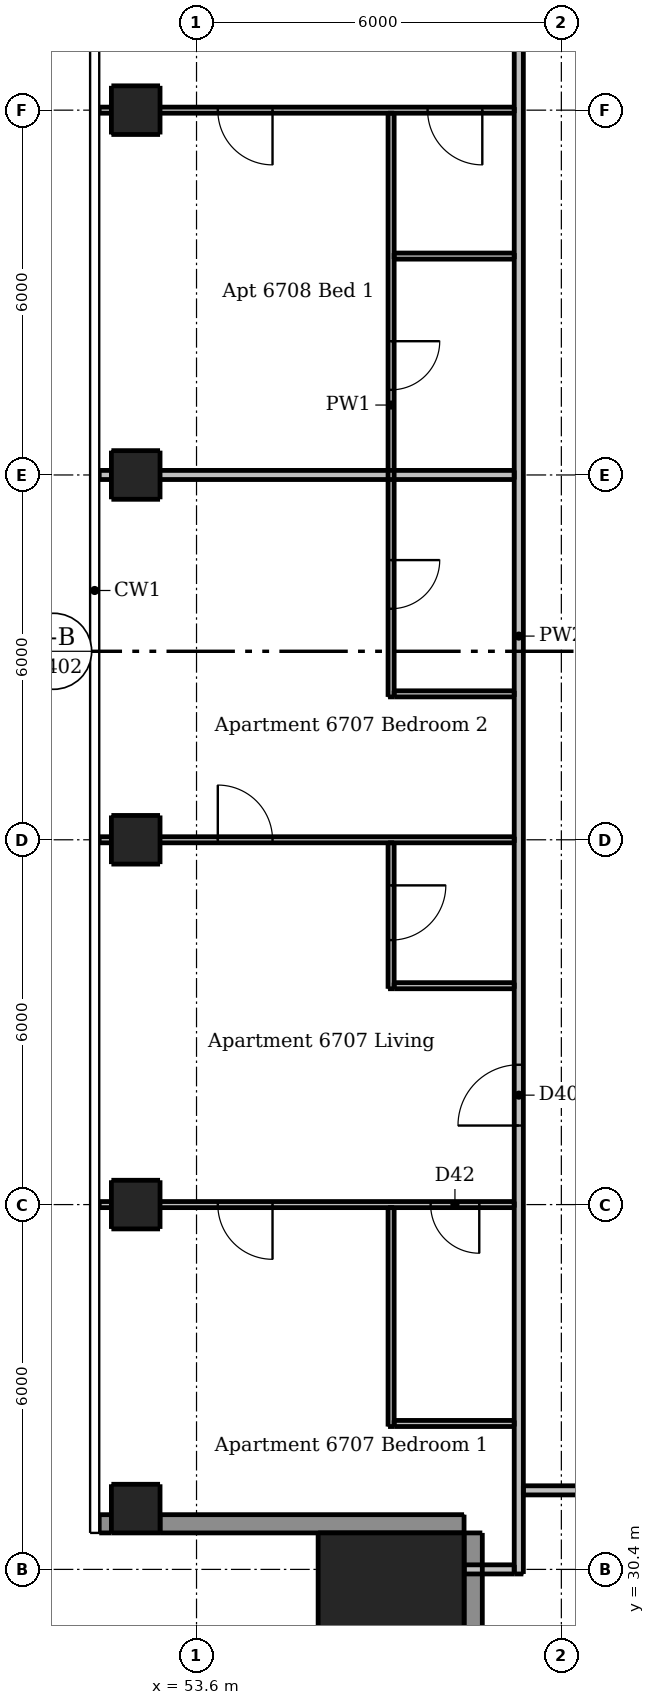
"""IFC4 building model, lengths in metres.
Left out: names, types, materials, properties, quantities, classifications, styles, units other than length and angle.
Written with IfcOpenShell. Run it as: python <this file> out.ifc"""

import sys

from ifc_helpers import new_model, si_unit, direction, frame, frame_2d, origin, origin_2d, place, context, subcontext, project, spatial, rectangle, extrude, element, fill, save


model = new_model("IFC4")
c1 = context("Model", 3, precision=1e-05, world=origin(), true_north=direction((0.0, 1.0)))
c2 = subcontext(c1, "Body", "Model", "MODEL_VIEW")
j1 = project(units=[si_unit("LENGTHUNIT", "METRE"), si_unit("PLANEANGLEUNIT", "RADIAN")], contexts=[c1])
p1 = place(None, origin())
s1 = spatial("IfcSite", under=j1, at=p1, CompositionType="ELEMENT")
p2 = place(p1, origin())
s2 = spatial("IfcBuilding", under=s1, at=p2, CompositionType="ELEMENT")
p3 = place(p2, frame((0.0, 0.0, 252.1)))
s3 = spatial("IfcBuildingStorey", under=s2, at=p3, CompositionType="ELEMENT", Elevation=252.1)
for number, where, z_axis, x_axis in (
    (1, (52.6, 31.4, 0.0), (0.0, 0.0, 1.0), (1.0, 0.0, 0.0)),
    (2, (52.6, 36.4, 0.0), (0.0, 0.0, 1.0), (1.0, 0.0, 0.0)),
    (3, (52.6, 42.4, 0.0), (0.0, 0.0, 1.0), (1.0, 0.0, 0.0)),
    (4, (52.6, 48.4, 0.0), (0.0, 0.0, 1.0), (1.0, 0.0, 0.0)),
    (5, (52.6, 54.4, 0.0), (0.0, 0.0, 1.0), (1.0, 0.0, 0.0)),
):
    element("IfcColumn", number, at=place(p3, frame(where, z_axis=z_axis, x_axis=x_axis)), inside=s3, PredefinedType="COLUMN", context=c2, shape_type="SweptSolid", body=[
        extrude(rectangle(XDim=0.8, YDim=0.8, at=origin_2d()), origin(), (0.0, 0.0, 1.0), 3.05),
    ])
p4 = place(p3, frame((56.8, 29.8, 0.0), z_axis=(0.0, 0.0, 1.0), x_axis=(1.0, 0.0, 0.0)))
e6 = element("IfcColumn", 6, at=p4, inside=s3, PredefinedType="COLUMN", context=c2, shape_type="SweptSolid", body=[
    extrude(rectangle(XDim=2.4, YDim=2.4, at=origin_2d()), origin(), (0.0, 0.0, 1.0), 3.3),
])
p5 = place(p3, frame((52.0, 31.15, 0.0), z_axis=(0.0, 0.0, 1.0), x_axis=(1.0, 0.0, 0.0)))
e7 = element("IfcWall", 7, at=p5, inside=s3, PredefinedType="SOLIDWALL", context=c2, shape_type="SweptSolid", body=[
    extrude(rectangle(XDim=0.2, YDim=0.3, at=frame_2d((0.1, 0.0))), origin(), (0.0, 0.0, 1.0), 3.05),
])
p6 = place(p3, frame((53.0, 31.15, 0.0), z_axis=(0.0, 0.0, 1.0), x_axis=(1.0, 0.0, 0.0)))
e8 = element("IfcWall", 8, at=p6, inside=s3, PredefinedType="SOLIDWALL", context=c2, shape_type="SweptSolid", body=[
    extrude(rectangle(XDim=5.0, YDim=0.3, at=frame_2d((2.5, 0.0))), origin(), (0.0, 0.0, 1.0), 3.05),
])
p7 = place(p3, frame((58.15, 31.0, 0.0), z_axis=(0.0, 0.0, 1.0), x_axis=(0.0, -1.0, 0.0)))
e9 = element("IfcWall", 9, at=p7, inside=s3, PredefinedType="SOLIDWALL", context=c2, shape_type="SweptSolid", body=[
    extrude(rectangle(XDim=6.0, YDim=0.3, at=frame_2d((3.0, 0.0))), origin(), (0.0, 0.0, 1.0), 3.05),
])
p8 = place(p7, frame((1.8, 0.0, 0.15)))
e10 = element("IfcOpeningElement", 10, at=p8, cuts=e9, PredefinedType="OPENING", context=c2, shape_type="SweptSolid", body=[
    extrude(rectangle(XDim=2.4, YDim=2.1, at=frame_2d((1.2, 1.05))), frame((0.0, 0.16, 0.0), z_axis=(0.0, -1.0, 0.0), x_axis=(1.0, 0.0, 0.0)), (0.0, 0.0, 1.0), 0.32),
])
p9 = place(p3, frame((56.8, 32.75, 0.0), z_axis=(0.0, 0.0, 1.0), x_axis=(0.0, 1.0, 0.0)))
e11 = element("IfcWall", 11, at=p9, inside=s3, PredefinedType="PARTITIONING", context=c2, shape_type="SweptSolid", body=[
    extrude(rectangle(XDim=3.6, YDim=0.1, at=frame_2d((1.8, 0.0))), origin(), (0.0, 0.0, 1.0), 3.05),
])
p10 = place(p3, frame((56.8, 42.35, 0.0), z_axis=(0.0, 0.0, 1.0), x_axis=(0.0, -1.0, 0.0)))
e12 = element("IfcWall", 12, at=p10, inside=s3, PredefinedType="PARTITIONING", context=c2, shape_type="SweptSolid", body=[
    extrude(rectangle(XDim=2.4, YDim=0.1, at=frame_2d((1.2, 0.0))), origin(), (0.0, 0.0, 1.0), 3.05),
])
p11 = place(p10, frame((0.7, 0.0, 0.0)))
e13 = element("IfcOpeningElement", 13, at=p11, cuts=e12, PredefinedType="OPENING", context=c2, shape_type="SweptSolid", body=[
    extrude(rectangle(XDim=0.9, YDim=2.1, at=frame_2d((0.45, 1.05))), frame((0.0, 0.06, 0.0), z_axis=(0.0, -1.0, 0.0), x_axis=(1.0, 0.0, 0.0)), (0.0, 0.0, 1.0), 0.12),
])
p12 = place(p3, frame((56.8, 54.35, 0.0), z_axis=(0.0, 0.0, 1.0), x_axis=(0.0, -1.0, 0.0)))
e14 = element("IfcWall", 14, at=p12, inside=s3, PredefinedType="PARTITIONING", context=c2, shape_type="SweptSolid", body=[
    extrude(rectangle(XDim=9.6, YDim=0.1, at=frame_2d((4.8, 0.0))), origin(), (0.0, 0.0, 1.0), 3.05),
])
p13 = place(p12, frame((7.35, 0.0, 0.0)))
e15 = element("IfcOpeningElement", 15, at=p13, cuts=e14, PredefinedType="OPENING", context=c2, shape_type="SweptSolid", body=[
    extrude(rectangle(XDim=0.8, YDim=2.1, at=frame_2d((0.4, 1.05))), frame((0.0, 0.06, 0.0), z_axis=(0.0, -1.0, 0.0), x_axis=(1.0, 0.0, 0.0)), (0.0, 0.0, 1.0), 0.12),
])
p14 = place(p12, frame((3.75, 0.0, 0.0)))
e16 = element("IfcOpeningElement", 16, at=p14, cuts=e14, PredefinedType="OPENING", context=c2, shape_type="SweptSolid", body=[
    extrude(rectangle(XDim=0.8, YDim=2.1, at=frame_2d((0.4, 1.05))), frame((0.0, 0.06, 0.0), z_axis=(0.0, -1.0, 0.0), x_axis=(1.0, 0.0, 0.0)), (0.0, 0.0, 1.0), 0.12),
])
p15 = place(p3, frame((58.825, 54.4, 0.0), z_axis=(0.0, 0.0, 1.0), x_axis=(-1.0, 0.0, 0.0)))
e17 = element("IfcWall", 17, at=p15, inside=s3, PredefinedType="PARTITIONING", context=c2, shape_type="SweptSolid", body=[
    extrude(rectangle(XDim=6.825, YDim=0.1, at=frame_2d((3.413, 0.0))), origin(), (0.0, 0.0, 1.0), 2.516),
])
p16 = place(p15, frame((0.525, 0.0, 0.0)))
e18 = element("IfcOpeningElement", 18, at=p16, cuts=e17, PredefinedType="OPENING", context=c2, shape_type="SweptSolid", body=[
    extrude(rectangle(XDim=0.9, YDim=2.1, at=frame_2d((0.45, 1.05))), frame((0.0, 0.06, 0.0), z_axis=(0.0, -1.0, 0.0), x_axis=(1.0, 0.0, 0.0)), (0.0, 0.0, 1.0), 0.12),
])
p17 = place(p15, frame((3.975, 0.0, 0.0)))
e19 = element("IfcOpeningElement", 19, at=p17, cuts=e17, PredefinedType="OPENING", context=c2, shape_type="SweptSolid", body=[
    extrude(rectangle(XDim=0.9, YDim=2.1, at=frame_2d((0.45, 1.05))), frame((0.0, 0.06, 0.0), z_axis=(0.0, -1.0, 0.0), x_axis=(1.0, 0.0, 0.0)), (0.0, 0.0, 1.0), 0.12),
])
for number, where, z_axis, x_axis in (
    (20, (56.85, 52.0, 0.0), (0.0, 0.0, 1.0), (1.0, 0.0, 0.0)),
    (21, (56.85, 44.8, 0.0), (0.0, 0.0, 1.0), (1.0, 0.0, 0.0)),
):
    element("IfcWall", number, at=place(p3, frame(where, z_axis=z_axis, x_axis=x_axis)), inside=s3, PredefinedType="PARTITIONING", context=c2, shape_type="SweptSolid", body=[
        extrude(rectangle(XDim=1.975, YDim=0.1, at=frame_2d((0.987, 0.0))), origin(), (0.0, 0.0, 1.0), 3.05),
    ])
p18 = place(p3, frame((52.0, 42.4, 0.0), z_axis=(0.0, 0.0, 1.0), x_axis=(1.0, 0.0, 0.0)))
e22 = element("IfcWall", 22, at=p18, inside=s3, PredefinedType="PARTITIONING", context=c2, shape_type="SweptSolid", body=[
    extrude(rectangle(XDim=6.825, YDim=0.1, at=frame_2d((3.413, 0.0))), origin(), (0.0, 0.0, 1.0), 2.516),
])
p19 = place(p18, frame((1.95, 0.0, 0.0)))
e23 = element("IfcOpeningElement", 23, at=p19, cuts=e22, PredefinedType="OPENING", context=c2, shape_type="SweptSolid", body=[
    extrude(rectangle(XDim=0.9, YDim=2.1, at=frame_2d((0.45, 1.05))), frame((0.0, 0.06, 0.0), z_axis=(0.0, -1.0, 0.0), x_axis=(1.0, 0.0, 0.0)), (0.0, 0.0, 1.0), 0.12),
])
p20 = place(p3, frame((56.85, 40.0, 0.0), z_axis=(0.0, 0.0, 1.0), x_axis=(1.0, 0.0, 0.0)))
e24 = element("IfcWall", 24, at=p20, inside=s3, PredefinedType="PARTITIONING", context=c2, shape_type="SweptSolid", body=[
    extrude(rectangle(XDim=1.975, YDim=0.1, at=frame_2d((0.987, 0.0))), origin(), (0.0, 0.0, 1.0), 3.05),
])
p21 = place(p3, frame((58.825, 36.4, 0.0), z_axis=(0.0, 0.0, 1.0), x_axis=(-1.0, 0.0, 0.0)))
e25 = element("IfcWall", 25, at=p21, inside=s3, PredefinedType="PARTITIONING", context=c2, shape_type="SweptSolid", body=[
    extrude(rectangle(XDim=6.825, YDim=0.1, at=frame_2d((3.413, 0.0))), origin(), (0.0, 0.0, 1.0), 2.516),
])
p22 = place(p21, frame((3.975, 0.0, 0.0)))
e26 = element("IfcOpeningElement", 26, at=p22, cuts=e25, PredefinedType="OPENING", context=c2, shape_type="SweptSolid", body=[
    extrude(rectangle(XDim=0.9, YDim=2.1, at=frame_2d((0.45, 1.05))), frame((0.0, 0.06, 0.0), z_axis=(0.0, -1.0, 0.0), x_axis=(1.0, 0.0, 0.0)), (0.0, 0.0, 1.0), 0.12),
])
p23 = place(p21, frame((0.575, 0.0, 0.0)))
e27 = element("IfcOpeningElement", 27, at=p23, cuts=e25, PredefinedType="OPENING", context=c2, shape_type="SweptSolid", body=[
    extrude(rectangle(XDim=0.8, YDim=2.1, at=frame_2d((0.4, 1.05))), frame((0.0, 0.06, 0.0), z_axis=(0.0, -1.0, 0.0), x_axis=(1.0, 0.0, 0.0)), (0.0, 0.0, 1.0), 0.12),
])
p24 = place(p3, frame((56.85, 32.8, 0.0), z_axis=(0.0, 0.0, 1.0), x_axis=(1.0, 0.0, 0.0)))
e28 = element("IfcWall", 28, at=p24, inside=s3, PredefinedType="PARTITIONING", context=c2, shape_type="SweptSolid", body=[
    extrude(rectangle(XDim=1.975, YDim=0.1, at=frame_2d((0.987, 0.0))), origin(), (0.0, 0.0, 1.0), 3.05),
])
p25 = place(p3, frame((58.9, 30.325, 0.0), z_axis=(0.0, 0.0, 1.0), x_axis=(0.0, 1.0, 0.0)))
e29 = element("IfcWall", 29, at=p25, inside=s3, PredefinedType="PARTITIONING", context=c2, shape_type="SweptSolid", body=[
    extrude(rectangle(XDim=30.85, YDim=0.15, at=frame_2d((15.425, 0.0))), origin(), (0.0, 0.0, 1.0), 3.05),
])
p26 = place(p25, frame((7.375, 0.0, 0.0)))
e30 = element("IfcOpeningElement", 30, at=p26, cuts=e29, PredefinedType="OPENING", context=c2, shape_type="SweptSolid", body=[
    extrude(rectangle(XDim=1.0, YDim=2.1, at=frame_2d((0.5, 1.05))), frame((0.0, 0.085, 0.0), z_axis=(0.0, -1.0, 0.0), x_axis=(1.0, 0.0, 0.0)), (0.0, 0.0, 1.0), 0.17),
])
p27 = place(p25, frame((26.925, 0.0, 0.0)))
e31 = element("IfcOpeningElement", 31, at=p27, cuts=e29, PredefinedType="OPENING", context=c2, shape_type="SweptSolid", body=[
    extrude(rectangle(XDim=1.0, YDim=2.1, at=frame_2d((0.5, 1.05))), frame((0.0, 0.085, 0.0), z_axis=(0.0, -1.0, 0.0), x_axis=(1.0, 0.0, 0.0)), (0.0, 0.0, 1.0), 0.17),
])
p28 = place(p3, frame((52.0, 48.4, 0.0), z_axis=(0.0, 0.0, 1.0), x_axis=(1.0, 0.0, 0.0)))
e32 = element("IfcWall", 32, at=p28, inside=s3, PredefinedType="PARTITIONING", context=c2, shape_type="SweptSolid", body=[
    extrude(rectangle(XDim=6.825, YDim=0.15, at=frame_2d((3.413, 0.0))), origin(), (0.0, 0.0, 1.0), 2.516),
])
p29 = place(p3, frame((89.525, 31.7, 0.0), z_axis=(0.0, 0.0, 1.0), x_axis=(-1.0, 0.0, 0.0)))
e33 = element("IfcWall", 33, at=p29, inside=s3, PredefinedType="PARTITIONING", context=c2, shape_type="SweptSolid", body=[
    extrude(rectangle(XDim=30.55, YDim=0.15, at=frame_2d((15.275, 0.0))), origin(), (0.0, 0.0, 1.0), 3.05),
])
p30 = place(p29, frame((26.775, 0.0, 0.0)))
e34 = element("IfcOpeningElement", 34, at=p30, cuts=e33, PredefinedType="OPENING", context=c2, shape_type="SweptSolid", body=[
    extrude(rectangle(XDim=1.0, YDim=2.1, at=frame_2d((0.5, 1.05))), frame((0.0, 0.085, 0.0), z_axis=(0.0, -1.0, 0.0), x_axis=(1.0, 0.0, 0.0)), (0.0, 0.0, 1.0), 0.17),
])
p31 = place(p29, frame((6.925, 0.0, 0.0)))
e35 = element("IfcOpeningElement", 35, at=p31, cuts=e33, PredefinedType="OPENING", context=c2, shape_type="SweptSolid", body=[
    extrude(rectangle(XDim=1.0, YDim=2.1, at=frame_2d((0.5, 1.05))), frame((0.0, 0.085, 0.0), z_axis=(0.0, -1.0, 0.0), x_axis=(1.0, 0.0, 0.0)), (0.0, 0.0, 1.0), 0.17),
])
p32 = place(p3, frame((58.0, 30.4, 0.0), z_axis=(0.0, 0.0, 1.0), x_axis=(1.0, 0.0, 0.0)))
e36 = element("IfcWall", 36, at=p32, inside=s3, PredefinedType="PARTITIONING", context=c2, shape_type="SweptSolid", body=[
    extrude(rectangle(XDim=0.825, YDim=0.15, at=frame_2d((0.413, 0.0))), origin(), (0.0, 0.0, 1.0), 3.05),
])
p33 = place(p26, origin())
e37 = element("IfcDoor", 37, at=p33, inside=s3, OperationType="SINGLE_SWING_LEFT", PredefinedType="DOOR", context=c2, shape_type="SweptSolid", body=[
    extrude(rectangle(XDim=1.0, YDim=2.1, at=frame_2d((0.5, 1.05))), frame((0.0, 0.025, 0.0), z_axis=(0.0, -1.0, 0.0), x_axis=(1.0, 0.0, 0.0)), (0.0, 0.0, 1.0), 0.05),
])
fill(e30, e37)
p34 = place(p11, origin())
e38 = element("IfcDoor", 38, at=p34, inside=s3, OperationType="SINGLE_SWING_LEFT", PredefinedType="DOOR", context=c2, shape_type="SweptSolid", body=[
    extrude(rectangle(XDim=0.9, YDim=2.1, at=frame_2d((0.45, 1.05))), frame((0.0, 0.025, 0.0), z_axis=(0.0, -1.0, 0.0), x_axis=(1.0, 0.0, 0.0)), (0.0, 0.0, 1.0), 0.05),
])
fill(e13, e38)
p35 = place(p22, origin())
e39 = element("IfcDoor", 39, at=p35, inside=s3, OperationType="SINGLE_SWING_LEFT", PredefinedType="DOOR", context=c2, shape_type="SweptSolid", body=[
    extrude(rectangle(XDim=0.9, YDim=2.1, at=frame_2d((0.45, 1.05))), frame((0.0, 0.025, 0.0), z_axis=(0.0, -1.0, 0.0), x_axis=(1.0, 0.0, 0.0)), (0.0, 0.0, 1.0), 0.05),
])
fill(e26, e39)
p36 = place(p23, origin())
e40 = element("IfcDoor", 40, at=p36, inside=s3, OperationType="SINGLE_SWING_LEFT", PredefinedType="DOOR", context=c2, shape_type="SweptSolid", body=[
    extrude(rectangle(XDim=0.8, YDim=2.1, at=frame_2d((0.4, 1.05))), frame((0.0, 0.025, 0.0), z_axis=(0.0, -1.0, 0.0), x_axis=(1.0, 0.0, 0.0)), (0.0, 0.0, 1.0), 0.05),
])
fill(e27, e40)
p37 = place(p19, origin())
e41 = element("IfcDoor", 41, at=p37, inside=s3, OperationType="SINGLE_SWING_LEFT", PredefinedType="DOOR", context=c2, shape_type="SweptSolid", body=[
    extrude(rectangle(XDim=0.9, YDim=2.1, at=frame_2d((0.45, 1.05))), frame((0.0, 0.025, 0.0), z_axis=(0.0, -1.0, 0.0), x_axis=(1.0, 0.0, 0.0)), (0.0, 0.0, 1.0), 0.05),
])
fill(e23, e41)
p38 = place(p13, origin())
e42 = element("IfcDoor", 42, at=p38, inside=s3, OperationType="SINGLE_SWING_LEFT", PredefinedType="DOOR", context=c2, shape_type="SweptSolid", body=[
    extrude(rectangle(XDim=0.8, YDim=2.1, at=frame_2d((0.4, 1.05))), frame((0.0, 0.025, 0.0), z_axis=(0.0, -1.0, 0.0), x_axis=(1.0, 0.0, 0.0)), (0.0, 0.0, 1.0), 0.05),
])
fill(e15, e42)
p39 = place(p16, origin())
e43 = element("IfcDoor", 43, at=p39, inside=s3, OperationType="SINGLE_SWING_LEFT", PredefinedType="DOOR", context=c2, shape_type="SweptSolid", body=[
    extrude(rectangle(XDim=0.9, YDim=2.1, at=frame_2d((0.45, 1.05))), frame((0.0, 0.025, 0.0), z_axis=(0.0, -1.0, 0.0), x_axis=(1.0, 0.0, 0.0)), (0.0, 0.0, 1.0), 0.05),
])
fill(e18, e43)
p40 = place(p17, origin())
e44 = element("IfcDoor", 44, at=p40, inside=s3, OperationType="SINGLE_SWING_LEFT", PredefinedType="DOOR", context=c2, shape_type="SweptSolid", body=[
    extrude(rectangle(XDim=0.9, YDim=2.1, at=frame_2d((0.45, 1.05))), frame((0.0, 0.025, 0.0), z_axis=(0.0, -1.0, 0.0), x_axis=(1.0, 0.0, 0.0)), (0.0, 0.0, 1.0), 0.05),
])
fill(e19, e44)
p41 = place(p14, origin())
e45 = element("IfcDoor", 45, at=p41, inside=s3, OperationType="SINGLE_SWING_LEFT", PredefinedType="DOOR", context=c2, shape_type="SweptSolid", body=[
    extrude(rectangle(XDim=0.8, YDim=2.1, at=frame_2d((0.4, 1.05))), frame((0.0, 0.025, 0.0), z_axis=(0.0, -1.0, 0.0), x_axis=(1.0, 0.0, 0.0)), (0.0, 0.0, 1.0), 0.05),
])
fill(e16, e45)
save(model, sys.argv[1])
